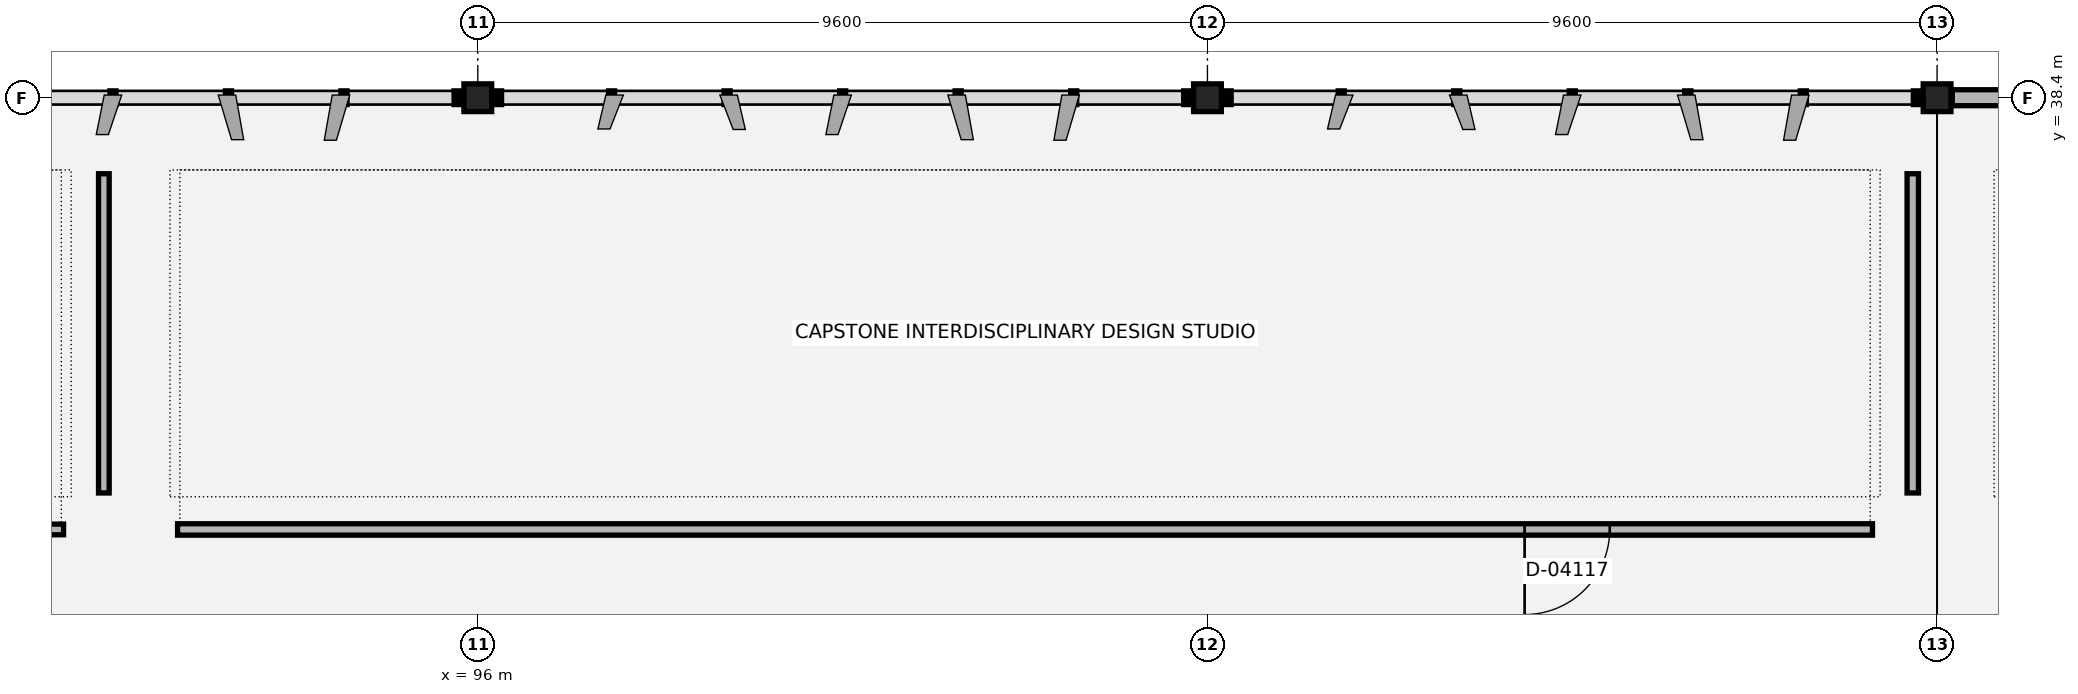
"""IFC4 building model, lengths in metres.
Left out: names, types, materials, properties, quantities, classifications, styles, units other than length and angle.
Written with IfcOpenShell. Run it as: python <this file> out.ifc"""

import sys

from ifc_helpers import new_model, si_unit, direction, frame, frame_2d, origin, origin_2d, place, context, subcontext, project, spatial, rectangle, extrude, element, fill, save


model = new_model("IFC4")
c1 = context("Model", 3, precision=1e-05, world=origin(), true_north=direction((0.0, 1.0)))
c2 = subcontext(c1, "Body", "Model", "MODEL_VIEW")
j1 = project(units=[si_unit("LENGTHUNIT", "METRE"), si_unit("PLANEANGLEUNIT", "RADIAN")], contexts=[c1])
p1 = place(None, origin())
s1 = spatial("IfcSite", under=j1, at=p1, CompositionType="ELEMENT")
p2 = place(p1, origin())
s2 = spatial("IfcBuilding", under=s1, at=p2, CompositionType="ELEMENT")
p3 = place(p2, frame((0.0, 0.0, 18.6)))
s3 = spatial("IfcBuildingStorey", under=s2, at=p3, CompositionType="ELEMENT", Elevation=18.6)
for number, where, z_axis, x_axis in (
    (1, (96.0, 38.4, 0.0), (0.0, 0.0, 1.0), (1.0, 0.0, 0.0)),
    (2, (105.6, 38.4, 0.0), (0.0, 0.0, 1.0), (1.0, 0.0, 0.0)),
    (3, (115.2, 38.4, 0.0), (0.0, 0.0, 1.0), (1.0, 0.0, 0.0)),
):
    element("IfcColumn", number, at=place(p3, frame(where, z_axis=z_axis, x_axis=x_axis)), inside=s3, PredefinedType="COLUMN", context=c2, shape_type="SweptSolid", body=[
        extrude(rectangle(XDim=0.365, YDim=0.365, at=origin_2d()), origin(), (0.0, 0.0, 1.0), 4.2),
    ])
p4 = place(p3, frame((119.8, 38.4, 0.0), z_axis=(0.0, 0.0, 1.0), x_axis=(-1.0, 0.0, 0.0)))
e4 = element("IfcWall", 4, at=p4, inside=s3, PredefinedType="SOLIDWALL", context=c2, shape_type="SweptSolid", body=[
    extrude(rectangle(XDim=4.4, YDim=0.21, at=frame_2d((2.2, 0.0))), origin(), (0.0, 0.0, 1.0), 3.07),
])
p5 = place(p4, frame((1.45, 0.0, 0.9)))
e5 = element("IfcOpeningElement", 5, at=p5, cuts=e4, PredefinedType="OPENING", context=c2, shape_type="SweptSolid", body=[
    extrude(rectangle(XDim=1.5, YDim=1.5, at=frame_2d((0.75, 0.75))), frame((0.0, 0.115, 0.0), z_axis=(0.0, -1.0, 0.0), x_axis=(1.0, 0.0, 0.0)), (0.0, 0.0, 1.0), 0.23),
])
p6 = place(p3, frame((67.85, 32.72, 0.0), z_axis=(0.0, 0.0, 1.0), x_axis=(1.0, 0.0, 0.0)))
e6 = element("IfcWall", 6, at=p6, inside=s3, PredefinedType="PARTITIONING", context=c2, shape_type="SweptSolid", body=[
    extrude(rectangle(XDim=22.7, YDim=0.14, at=frame_2d((11.35, 0.0))), origin(), (0.0, 0.0, 1.0), 3.05),
])
p7 = place(p6, frame((3.523, 0.0, 0.0)))
e7 = element("IfcOpeningElement", 7, at=p7, cuts=e6, PredefinedType="OPENING", context=c2, shape_type="SweptSolid", body=[
    extrude(rectangle(XDim=1.08, YDim=2.15, at=frame_2d((0.54, 1.075))), frame((0.0, 0.08, 0.0), z_axis=(0.0, -1.0, 0.0), x_axis=(1.0, 0.0, 0.0)), (0.0, 0.0, 1.0), 0.16),
])
p8 = place(p3, frame((91.08, 33.2, 0.0), z_axis=(0.0, 0.0, 1.0), x_axis=(0.0, 1.0, 0.0)))
e8 = element("IfcWall", 8, at=p8, inside=s3, PredefinedType="PARTITIONING", context=c2, shape_type="SweptSolid", body=[
    extrude(rectangle(XDim=4.2, YDim=0.14, at=frame_2d((2.1, 0.0))), origin(), (0.0, 0.0, 1.0), 3.05),
])
p9 = place(p3, frame((92.05, 32.72, 0.0), z_axis=(0.0, 0.0, 1.0), x_axis=(1.0, 0.0, 0.0)))
e9 = element("IfcWall", 9, at=p9, inside=s3, PredefinedType="PARTITIONING", context=c2, shape_type="SweptSolid", body=[
    extrude(rectangle(XDim=22.3, YDim=0.15, at=frame_2d((11.15, 0.0))), origin(), (0.0, 0.0, 1.0), 3.05),
])
p10 = place(p9, frame((17.723, 0.0, 0.0)))
e10 = element("IfcOpeningElement", 10, at=p10, cuts=e9, PredefinedType="OPENING", context=c2, shape_type="SweptSolid", body=[
    extrude(rectangle(XDim=1.12, YDim=2.15, at=frame_2d((0.56, 1.075))), frame((0.0, 0.085, 0.0), z_axis=(0.0, -1.0, 0.0), x_axis=(1.0, 0.0, 0.0)), (0.0, 0.0, 1.0), 0.17),
])
p11 = place(p3, frame((114.88, 33.2, 0.0), z_axis=(0.0, 0.0, 1.0), x_axis=(0.0, 1.0, 0.0)))
e11 = element("IfcWall", 11, at=p11, inside=s3, PredefinedType="PARTITIONING", context=c2, shape_type="SweptSolid", body=[
    extrude(rectangle(XDim=4.2, YDim=0.15, at=frame_2d((2.1, 0.0))), origin(), (0.0, 0.0, 1.0), 3.05),
])
p12 = place(p10, origin())
e12 = element("IfcDoor", 12, at=p12, inside=s3, OperationType="SINGLE_SWING_RIGHT", PredefinedType="DOOR", context=c2, shape_type="SweptSolid", body=[
    extrude(rectangle(XDim=1.12, YDim=2.15, at=frame_2d((0.56, 1.075))), frame((0.0, 0.025, 0.0), z_axis=(0.0, -1.0, 0.0), x_axis=(1.0, 0.0, 0.0)), (0.0, 0.0, 1.0), 0.05),
])
fill(e10, e12)
save(model, sys.argv[1])
